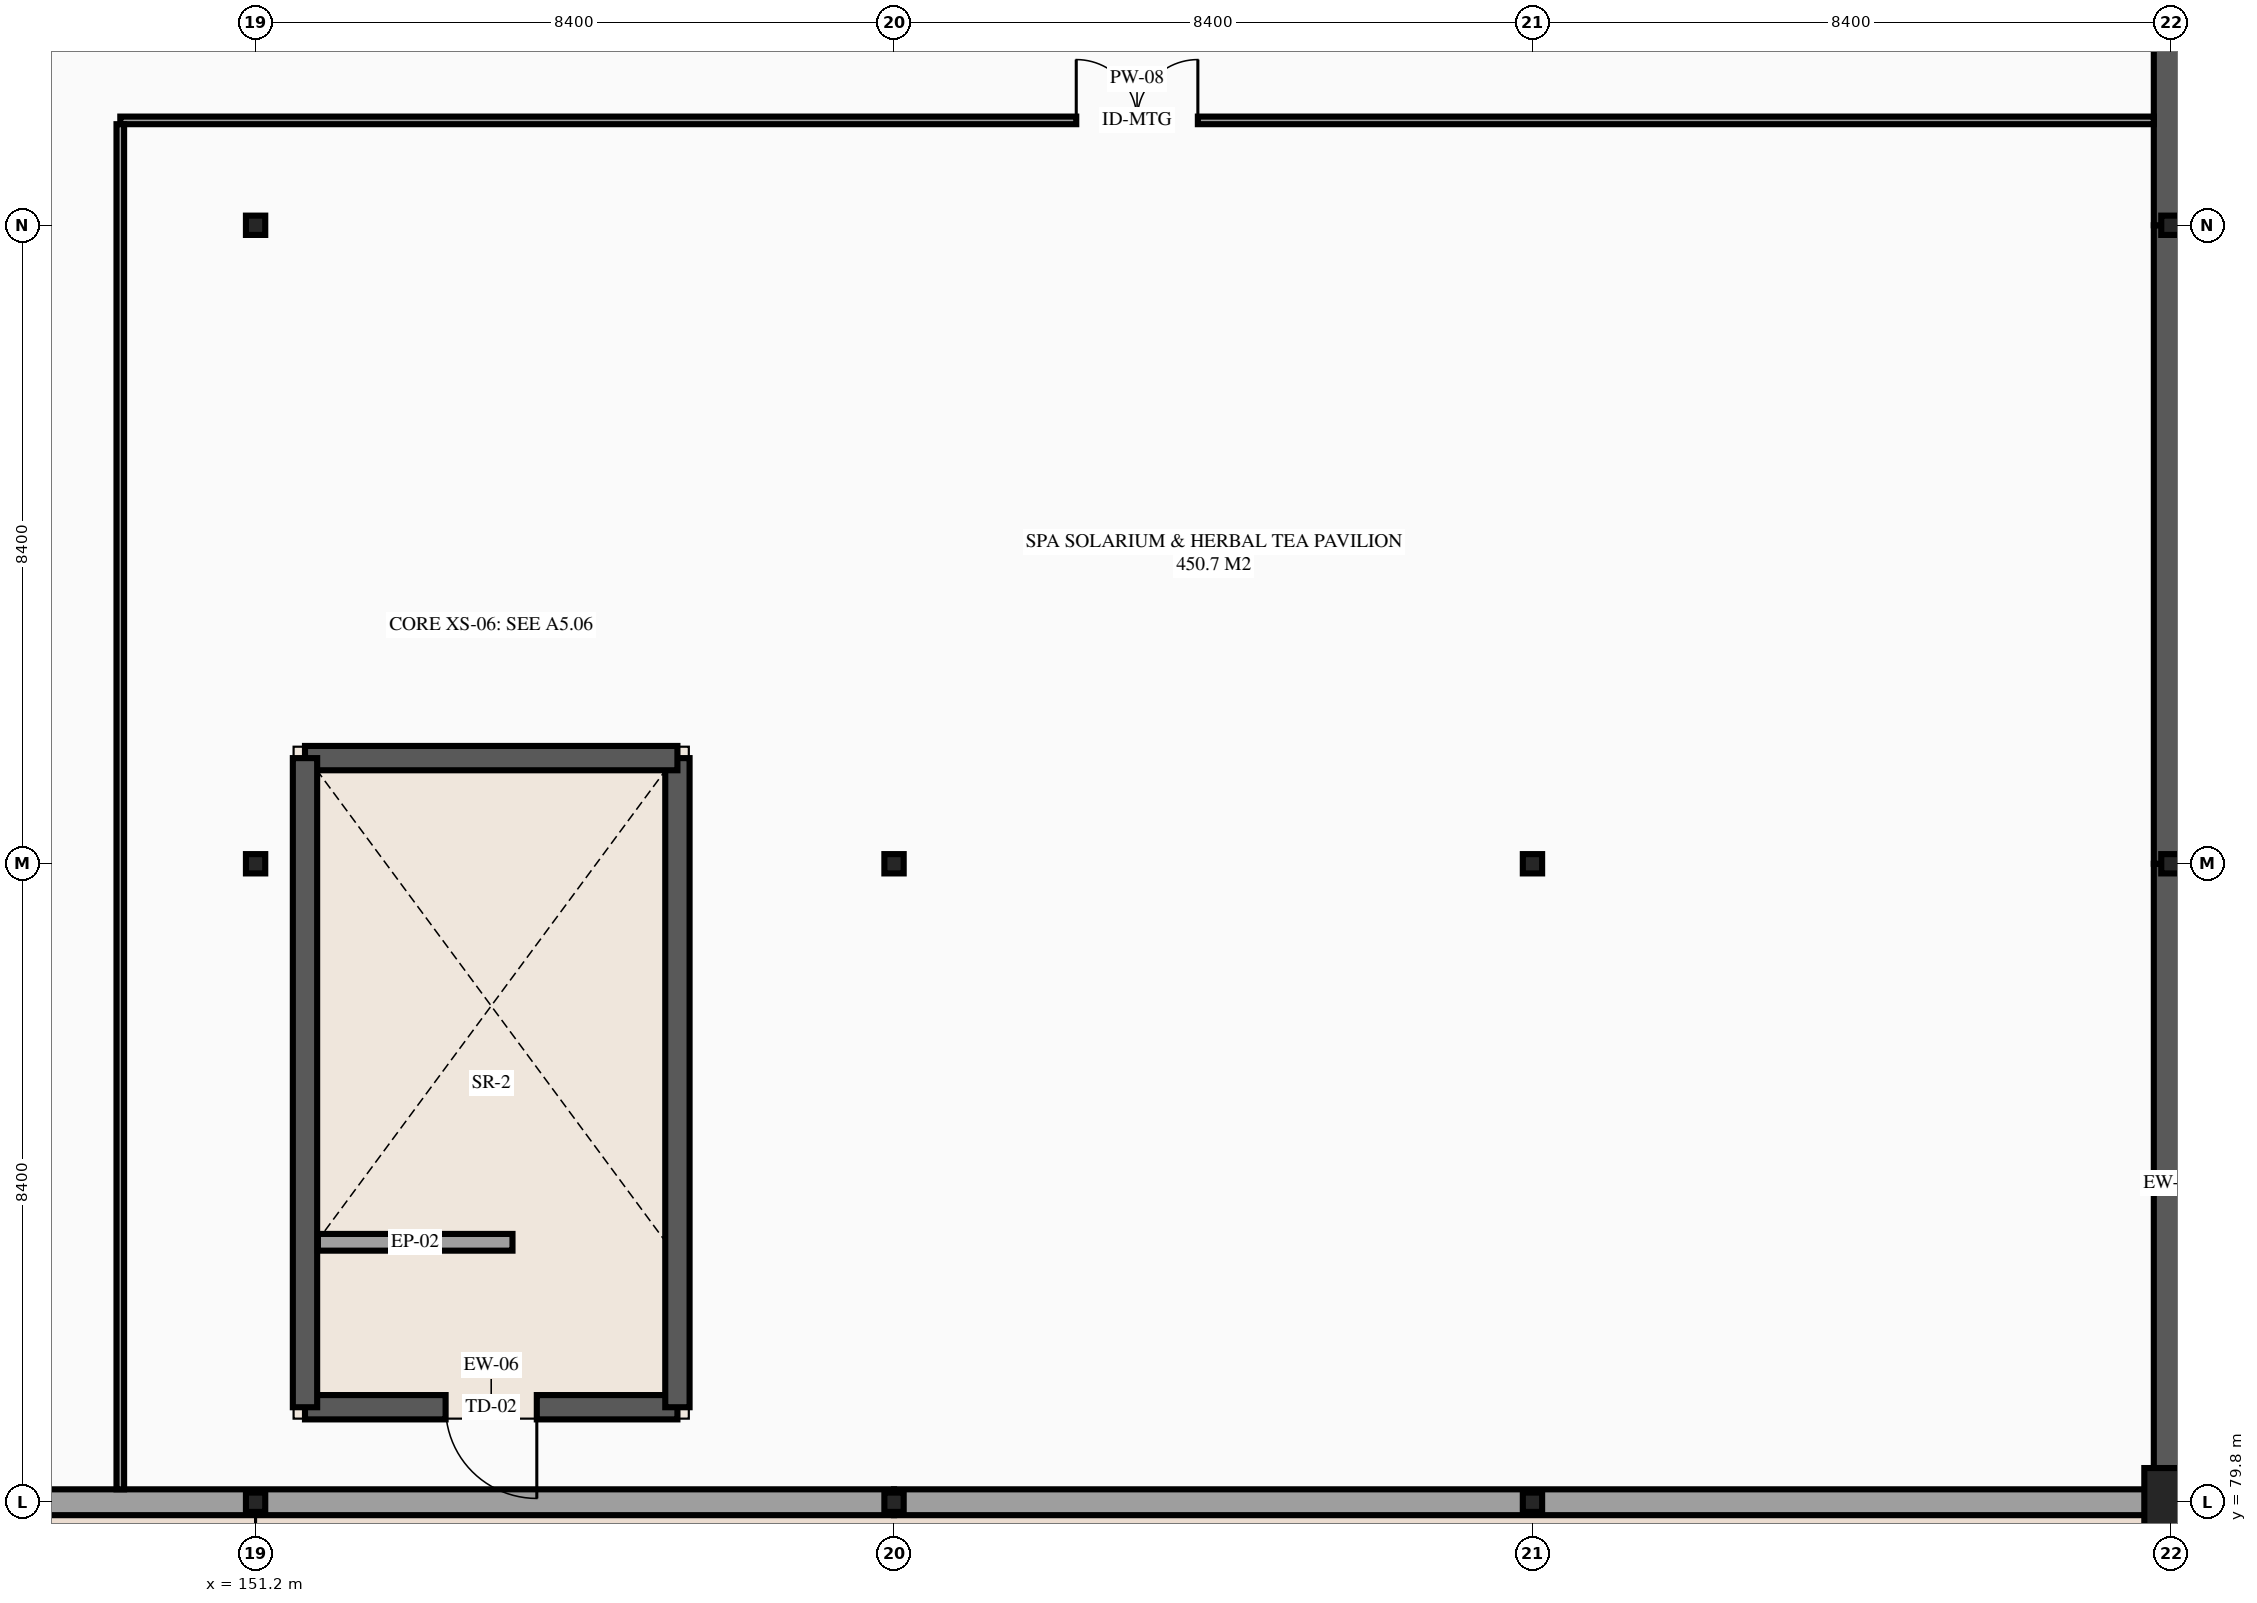
"""IFC4 building model, lengths in metres.
Left out: names, types, materials, properties, quantities, classifications, styles, units other than length and angle.
Written with IfcOpenShell. Run it as: python <this file> out.ifc"""

import sys

from ifc_helpers import new_model, si_unit, direction, frame, frame_2d, origin, origin_2d, place, context, subcontext, project, spatial, rectangle, hollow_rectangle, extrude, element, fill, save


model = new_model("IFC4")
c1 = context("Model", 3, precision=1e-05, world=origin(), true_north=direction((0.0, 1.0)))
c2 = subcontext(c1, "Body", "Model", "MODEL_VIEW")
j1 = project(units=[si_unit("LENGTHUNIT", "METRE"), si_unit("PLANEANGLEUNIT", "RADIAN")], contexts=[c1])
p1 = place(None, origin())
s1 = spatial("IfcSite", under=j1, at=p1, CompositionType="ELEMENT")
p2 = place(p1, origin())
s2 = spatial("IfcBuilding", under=s1, at=p2, CompositionType="ELEMENT")
p3 = place(p2, frame((0.0, 0.0, 14.1)))
s3 = spatial("IfcBuildingStorey", under=s2, at=p3, CompositionType="ELEMENT", Elevation=14.1)
for number, where, z_axis, x_axis in (
    (1, (151.2, 79.8, 0.0), (0.0, 0.0, 1.0), (1.0, 0.0, 0.0)),
    (2, (151.2, 88.2, 0.0), (0.0, 0.0, 1.0), (1.0, 0.0, 0.0)),
    (3, (151.2, 96.6, 0.0), (0.0, 0.0, 1.0), (1.0, 0.0, 0.0)),
    (4, (159.6, 79.8, 0.0), (0.0, 0.0, 1.0), (1.0, 0.0, 0.0)),
    (5, (159.6, 88.2, 0.0), (0.0, 0.0, 1.0), (1.0, 0.0, 0.0)),
    (6, (168.0, 79.8, 0.0), (0.0, 0.0, 1.0), (1.0, 0.0, 0.0)),
    (7, (168.0, 88.2, 0.0), (0.0, 0.0, 1.0), (1.0, 0.0, 0.0)),
):
    element("IfcColumn", number, at=place(p3, frame(where, z_axis=z_axis, x_axis=x_axis)), inside=s3, PredefinedType="COLUMN", context=c2, shape_type="SweptSolid", body=[
        extrude(hollow_rectangle(XDim=0.254, YDim=0.254, WallThickness=0.012, InnerFilletRadius=0.012, OuterFilletRadius=0.024, at=origin_2d()), origin(), (0.0, 0.0, 1.0), 4.2),
    ])
p4 = place(p3, frame((176.4, 79.8, 0.0), z_axis=(0.0, 0.0, 1.0), x_axis=(1.0, 0.0, 0.0)))
e8 = element("IfcColumn", 8, at=p4, inside=s3, PredefinedType="COLUMN", context=c2, shape_type="SweptSolid", body=[
    extrude(rectangle(XDim=0.7, YDim=0.9, at=origin_2d()), origin(), (0.0, 0.0, 1.0), 4.2),
])
for number, where, z_axis, x_axis in (
    (9, (176.4, 88.2, 0.0), (0.0, 0.0, 1.0), (1.0, 0.0, 0.0)),
    (10, (176.4, 96.6, 0.0), (0.0, 0.0, 1.0), (1.0, 0.0, 0.0)),
):
    element("IfcColumn", number, at=place(p3, frame(where, z_axis=z_axis, x_axis=x_axis)), inside=s3, PredefinedType="COLUMN", context=c2, shape_type="SweptSolid", body=[
        extrude(hollow_rectangle(XDim=0.254, YDim=0.254, WallThickness=0.012, InnerFilletRadius=0.012, OuterFilletRadius=0.024, at=origin_2d()), origin(), (0.0, 0.0, 1.0), 4.2),
    ])
p5 = place(p3, frame((176.4, 79.8, 0.0), z_axis=(0.0, 0.0, 1.0), x_axis=(0.0, 1.0, 0.0)))
e11 = element("IfcWall", 11, at=p5, inside=s3, PredefinedType="STANDARD", context=c2, shape_type="SweptSolid", body=[
    extrude(rectangle(XDim=8.4, YDim=0.45, at=frame_2d((4.2, 0.0))), origin(), (0.0, 0.0, 1.0), 4.2),
])
p6 = place(p3, frame((176.4, 88.2, 0.0), z_axis=(0.0, 0.0, 1.0), x_axis=(0.0, 1.0, 0.0)))
e12 = element("IfcWall", 12, at=p6, inside=s3, PredefinedType="STANDARD", context=c2, shape_type="SweptSolid", body=[
    extrude(rectangle(XDim=8.4, YDim=0.45, at=frame_2d((4.2, 0.0))), origin(), (0.0, 0.0, 1.0), 4.2),
])
p7 = place(p3, frame((176.4, 96.6, 0.0), z_axis=(0.0, 0.0, 1.0), x_axis=(0.0, 1.0, 0.0)))
e13 = element("IfcWall", 13, at=p7, inside=s3, PredefinedType="STANDARD", context=c2, shape_type="SweptSolid", body=[
    extrude(rectangle(XDim=8.4, YDim=0.45, at=frame_2d((4.2, 0.0))), origin(), (0.0, 0.0, 1.0), 4.2),
])
p8 = place(p3, frame((142.8, 79.8, 0.0), z_axis=(0.0, 0.0, 1.0), x_axis=(1.0, 0.0, 0.0)))
e14 = element("IfcWall", 14, at=p8, inside=s3, PredefinedType="STANDARD", context=c2, shape_type="SweptSolid", body=[
    extrude(rectangle(XDim=16.8, YDim=0.34, at=frame_2d((8.4, 0.0))), origin(), (0.0, 0.0, 1.0), 3.15),
])
p9 = place(p3, frame((151.85, 81.05, 0.0), z_axis=(0.0, 0.0, 1.0), x_axis=(1.0, 0.0, 0.0)))
e15 = element("IfcWall", 15, at=p9, inside=s3, PredefinedType="STANDARD", context=c2, shape_type="SweptSolid", body=[
    extrude(rectangle(XDim=4.9, YDim=0.32, at=frame_2d((2.45, 0.0))), origin(), (0.0, 0.0, 1.0), 2.65),
])
p10 = place(p9, frame((3.05, 0.0, 0.0), z_axis=(0.0, 0.0, 1.0), x_axis=(-1.0, 0.0, 0.0)))
e16 = element("IfcOpeningElement", 16, at=p10, cuts=e15, PredefinedType="OPENING", context=c2, shape_type="SweptSolid", body=[
    extrude(rectangle(XDim=1.2, YDim=2.04, at=frame_2d((0.6, 1.02))), frame((0.0, 0.17, 0.0), z_axis=(0.0, -1.0, 0.0), x_axis=(1.0, 0.0, 0.0)), (0.0, 0.0, 1.0), 0.34),
])
p11 = place(p3, frame((156.75, 81.05, 0.0), z_axis=(0.0, 0.0, 1.0), x_axis=(0.0, 1.0, 0.0)))
e17 = element("IfcWall", 17, at=p11, inside=s3, PredefinedType="STANDARD", context=c2, shape_type="SweptSolid", body=[
    extrude(rectangle(XDim=8.54, YDim=0.32, at=frame_2d((4.27, 0.0))), origin(), (0.0, 0.0, 1.0), 2.65),
])
p12 = place(p3, frame((156.75, 89.59, 0.0), z_axis=(0.0, 0.0, 1.0), x_axis=(-1.0, 0.0, 0.0)))
e18 = element("IfcWall", 18, at=p12, inside=s3, PredefinedType="STANDARD", context=c2, shape_type="SweptSolid", body=[
    extrude(rectangle(XDim=4.9, YDim=0.32, at=frame_2d((2.45, 0.0))), origin(), (0.0, 0.0, 1.0), 2.65),
])
p13 = place(p3, frame((151.85, 89.59, 0.0), z_axis=(0.0, 0.0, 1.0), x_axis=(0.0, -1.0, 0.0)))
e19 = element("IfcWall", 19, at=p13, inside=s3, PredefinedType="STANDARD", context=c2, shape_type="SweptSolid", body=[
    extrude(rectangle(XDim=8.54, YDim=0.32, at=frame_2d((4.27, 0.0))), origin(), (0.0, 0.0, 1.0), 2.65),
])
p14 = place(p3, frame((152.02, 83.22, 0.0), z_axis=(0.0, 0.0, 1.0), x_axis=(1.0, 0.0, 0.0)))
e20 = element("IfcWall", 20, at=p14, inside=s3, PredefinedType="PARAPET", context=c2, shape_type="SweptSolid", body=[
    extrude(rectangle(XDim=2.56, YDim=0.22, at=frame_2d((1.28, 0.0))), origin(), (0.0, 0.0, 1.0), 1.14),
])
p15 = place(p3, frame((149.42, 97.98, 0.0), z_axis=(0.0, 0.0, 1.0), x_axis=(1.0, 0.0, 0.0)))
e21 = element("IfcWall", 21, at=p15, inside=s3, PredefinedType="PARTITIONING", context=c2, shape_type="SweptSolid", body=[
    extrude(rectangle(XDim=26.755, YDim=0.1, at=frame_2d((13.377, 0.0))), origin(), (0.0, 0.0, 1.0), 3.895),
])
p16 = place(p15, frame((12.577, 0.0, 0.0)))
e22 = element("IfcOpeningElement", 22, at=p16, cuts=e21, PredefinedType="OPENING", context=c2, shape_type="SweptSolid", body=[
    extrude(rectangle(XDim=1.6, YDim=2.25, at=frame_2d((0.8, 1.125))), frame((0.0, 0.06, 0.0), z_axis=(0.0, -1.0, 0.0), x_axis=(1.0, 0.0, 0.0)), (0.0, 0.0, 1.0), 0.12),
])
p17 = place(p3, frame((149.42, 79.97, 0.0), z_axis=(0.0, 0.0, 1.0), x_axis=(0.0, 1.0, 0.0)))
e23 = element("IfcWall", 23, at=p17, inside=s3, PredefinedType="PARTITIONING", context=c2, shape_type="SweptSolid", body=[
    extrude(rectangle(XDim=17.96, YDim=0.1, at=frame_2d((8.98, 0.0))), origin(), (0.0, 0.0, 1.0), 3.895),
])
p18 = place(p3, frame((159.6, 79.8, 0.0), z_axis=(0.0, 0.0, 1.0), x_axis=(1.0, 0.0, 0.0)))
e24 = element("IfcWall", 24, at=p18, inside=s3, PredefinedType="STANDARD", context=c2, shape_type="SweptSolid", body=[
    extrude(rectangle(XDim=16.8, YDim=0.34, at=frame_2d((8.4, 0.0))), origin(), (0.0, 0.0, 1.0), 3.2),
])
p19 = place(p10, origin())
e25 = element("IfcDoor", 25, at=p19, inside=s3, OperationType="SINGLE_SWING_RIGHT", PredefinedType="TRAPDOOR", context=c2, shape_type="SweptSolid", body=[
    extrude(rectangle(XDim=1.2, YDim=2.04, at=frame_2d((0.6, 1.02))), frame((0.0, 0.025, 0.0), z_axis=(0.0, -1.0, 0.0), x_axis=(1.0, 0.0, 0.0)), (0.0, 0.0, 1.0), 0.05),
])
fill(e16, e25)
p20 = place(p16, origin())
e26 = element("IfcDoor", 26, at=p20, inside=s3, OperationType="DOUBLE_DOOR_SINGLE_SWING", PredefinedType="DOOR", context=c2, shape_type="SweptSolid", body=[
    extrude(rectangle(XDim=1.6, YDim=2.25, at=frame_2d((0.8, 1.125))), frame((0.0, 0.025, 0.0), z_axis=(0.0, -1.0, 0.0), x_axis=(1.0, 0.0, 0.0)), (0.0, 0.0, 1.0), 0.05),
])
fill(e22, e26)
save(model, sys.argv[1])
